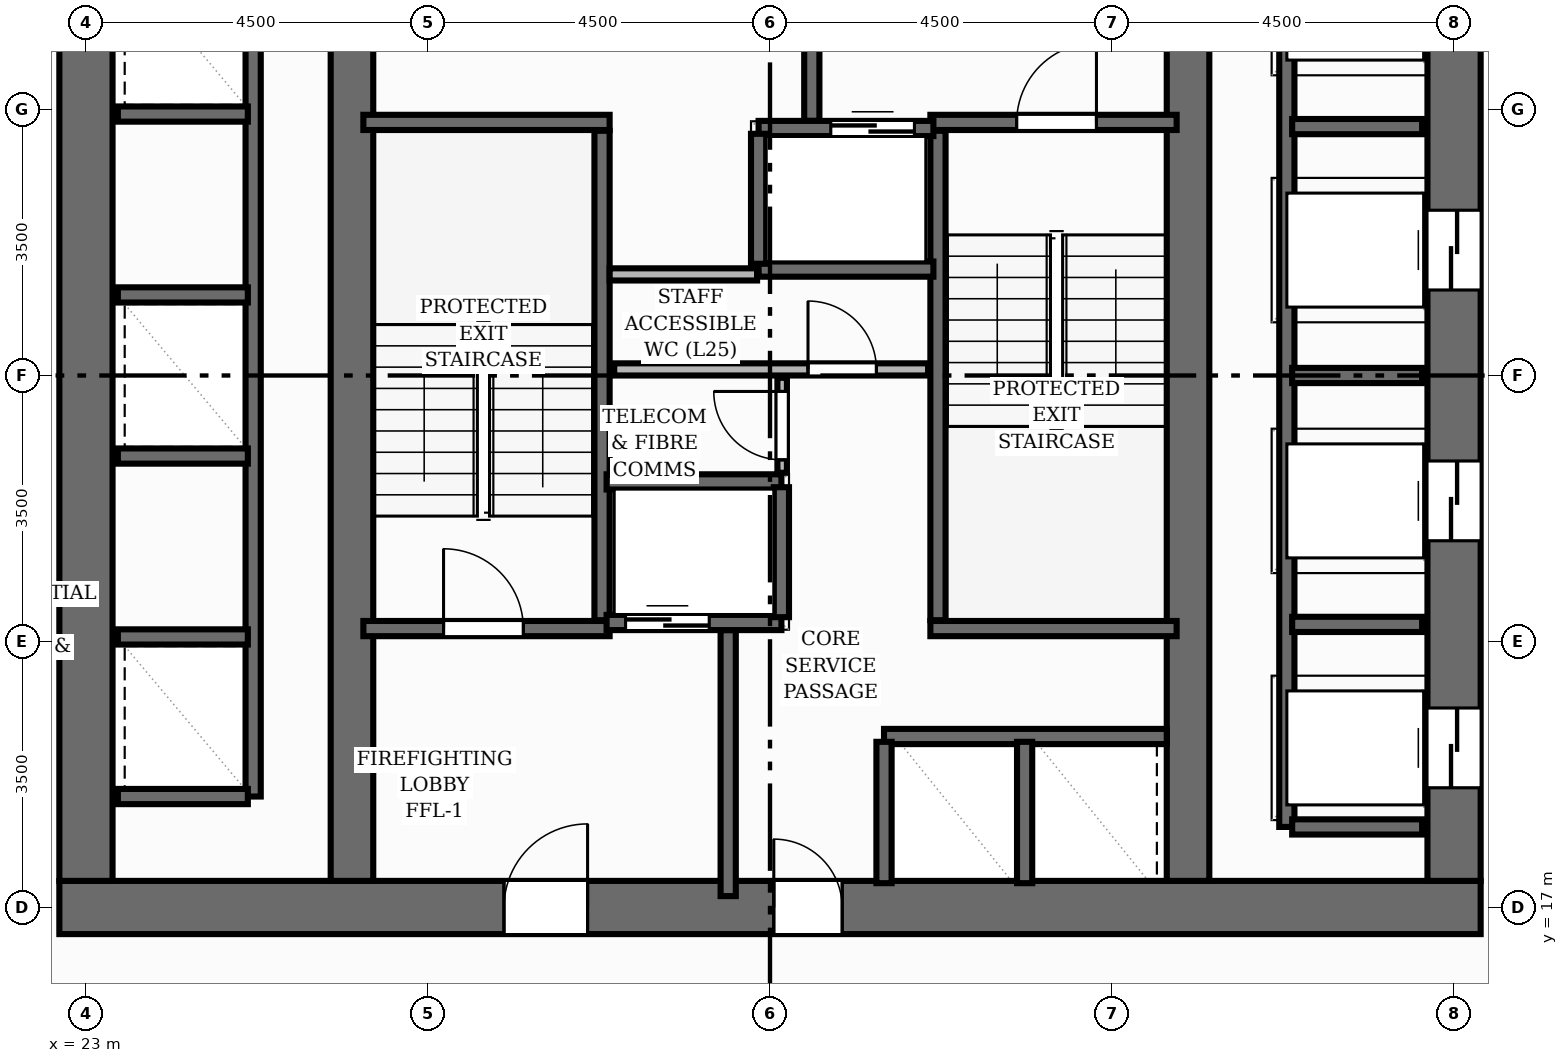
"""IFC4 building model, lengths in metres.
Left out: names, types, materials, properties, quantities, classifications, styles, units other than length and angle.
Written with IfcOpenShell. Run it as: python <this file> out.ifc"""

import sys

from ifc_helpers import new_model, si_unit, direction, frame, frame_2d, origin, place, context, subcontext, project, spatial, rectangle, extrude, element, fill, save


model = new_model("IFC4")
c1 = context("Model", 3, precision=1e-05, world=origin(), true_north=direction((0.0, 1.0)))
c2 = subcontext(c1, "Body", "Model", "MODEL_VIEW")
j1 = project(units=[si_unit("LENGTHUNIT", "METRE"), si_unit("PLANEANGLEUNIT", "RADIAN")], contexts=[c1])
p1 = place(None, origin())
s1 = spatial("IfcSite", under=j1, at=p1, CompositionType="ELEMENT")
p2 = place(p1, origin())
s2 = spatial("IfcBuilding", under=s1, at=p2, CompositionType="ELEMENT")
p3 = place(p2, frame((0.0, 0.0, 86.88)))
s3 = spatial("IfcBuildingStorey", under=s2, at=p3, CompositionType="ELEMENT", Elevation=86.88)
p4 = place(p3, frame((22.65, 17.0, 0.0), z_axis=(0.0, 0.0, 1.0), x_axis=(1.0, 0.0, 0.0)))
e1 = element("IfcWall", 1, at=p4, inside=s3, PredefinedType="SHEAR", context=c2, shape_type="SweptSolid", body=[
    extrude(rectangle(XDim=18.7, YDim=0.7, at=frame_2d((9.35, 0.0))), origin(), (0.0, 0.0, 1.0), 3.2),
])
p5 = place(p4, frame((5.85, 0.0, 0.0)))
e2 = element("IfcOpeningElement", 2, at=p5, cuts=e1, PredefinedType="OPENING", context=c2, shape_type="SweptSolid", body=[
    extrude(rectangle(XDim=1.1, YDim=2.15, at=frame_2d((0.55, 1.075))), frame((0.0, 0.36, 0.0), z_axis=(0.0, -1.0, 0.0), x_axis=(1.0, 0.0, 0.0)), (0.0, 0.0, 1.0), 0.72),
])
p6 = place(p4, frame((9.4, 0.0, 0.0)))
e3 = element("IfcOpeningElement", 3, at=p6, cuts=e1, PredefinedType="OPENING", context=c2, shape_type="SweptSolid", body=[
    extrude(rectangle(XDim=0.9, YDim=2.1, at=frame_2d((0.45, 1.05))), frame((0.0, 0.36, 0.0), z_axis=(0.0, -1.0, 0.0), x_axis=(1.0, 0.0, 0.0)), (0.0, 0.0, 1.0), 0.72),
])
p7 = place(p3, frame((23.0, 17.35, 0.0), z_axis=(0.0, 0.0, 1.0), x_axis=(0.0, 1.0, 0.0)))
e4 = element("IfcWall", 4, at=p7, inside=s3, PredefinedType="SHEAR", context=c2, shape_type="SweptSolid", body=[
    extrude(rectangle(XDim=13.3, YDim=0.7, at=frame_2d((6.65, 0.0))), origin(), (0.0, 0.0, 1.0), 3.2),
])
p8 = place(p3, frame((41.0, 17.35, 0.0), z_axis=(0.0, 0.0, 1.0), x_axis=(0.0, 1.0, 0.0)))
e5 = element("IfcWall", 5, at=p8, inside=s3, PredefinedType="SHEAR", context=c2, shape_type="SweptSolid", body=[
    extrude(rectangle(XDim=13.3, YDim=0.7, at=frame_2d((6.65, 0.0))), origin(), (0.0, 0.0, 1.0), 3.2),
])
p9 = place(p8, frame((1.225, 0.0, 0.0)))
e6 = element("IfcOpeningElement", 6, at=p9, cuts=e5, PredefinedType="OPENING", context=c2, shape_type="SweptSolid", body=[
    extrude(rectangle(XDim=1.05, YDim=2.15, at=frame_2d((0.525, 1.075))), frame((0.0, 0.36, 0.0), z_axis=(0.0, -1.0, 0.0), x_axis=(1.0, 0.0, 0.0)), (0.0, 0.0, 1.0), 0.72),
])
p10 = place(p8, frame((4.475, 0.0, 0.0)))
e7 = element("IfcOpeningElement", 7, at=p10, cuts=e5, PredefinedType="OPENING", context=c2, shape_type="SweptSolid", body=[
    extrude(rectangle(XDim=1.05, YDim=2.15, at=frame_2d((0.525, 1.075))), frame((0.0, 0.36, 0.0), z_axis=(0.0, -1.0, 0.0), x_axis=(1.0, 0.0, 0.0)), (0.0, 0.0, 1.0), 0.72),
])
p11 = place(p8, frame((7.775, 0.0, 0.0)))
e8 = element("IfcOpeningElement", 8, at=p11, cuts=e5, PredefinedType="OPENING", context=c2, shape_type="SweptSolid", body=[
    extrude(rectangle(XDim=1.05, YDim=2.15, at=frame_2d((0.525, 1.075))), frame((0.0, 0.36, 0.0), z_axis=(0.0, -1.0, 0.0), x_axis=(1.0, 0.0, 0.0)), (0.0, 0.0, 1.0), 0.72),
])
p12 = place(p8, frame((11.025, 0.0, 0.0)))
e9 = element("IfcOpeningElement", 9, at=p12, cuts=e5, PredefinedType="OPENING", context=c2, shape_type="SweptSolid", body=[
    extrude(rectangle(XDim=1.05, YDim=2.15, at=frame_2d((0.525, 1.075))), frame((0.0, 0.36, 0.0), z_axis=(0.0, -1.0, 0.0), x_axis=(1.0, 0.0, 0.0)), (0.0, 0.0, 1.0), 0.72),
])
for number, where, z_axis, x_axis in (
    (10, (26.5, 17.35, 0.0), (0.0, 0.0, 1.0), (0.0, 1.0, 0.0)),
    (11, (37.5, 17.35, 0.0), (0.0, 0.0, 1.0), (0.0, 1.0, 0.0)),
):
    element("IfcWall", number, at=place(p3, frame(where, z_axis=z_axis, x_axis=x_axis)), inside=s3, PredefinedType="SHEAR", context=c2, shape_type="SweptSolid", body=[
        extrude(rectangle(XDim=13.3, YDim=0.56, at=frame_2d((6.65, 0.0))), origin(), (0.0, 0.0, 1.0), 3.2),
    ])
p13 = place(p3, frame((29.79, 20.78, 0.0), z_axis=(0.0, 0.0, 1.0), x_axis=(0.0, 1.0, 0.0)))
e12 = element("IfcWall", 12, at=p13, inside=s3, PredefinedType="SHEAR", context=c2, shape_type="SweptSolid", body=[
    extrude(rectangle(XDim=6.44, YDim=0.2, at=frame_2d((3.22, 0.0))), origin(), (0.0, 0.0, 1.0), 3.2),
])
p14 = place(p3, frame((26.65, 27.33, 0.0), z_axis=(0.0, 0.0, 1.0), x_axis=(1.0, 0.0, 0.0)))
e13 = element("IfcWall", 13, at=p14, inside=s3, PredefinedType="SHEAR", context=c2, shape_type="SweptSolid", body=[
    extrude(rectangle(XDim=3.24, YDim=0.2, at=frame_2d((1.62, 0.0))), origin(), (0.0, 0.0, 1.0), 3.2),
])
p15 = place(p3, frame((26.65, 20.67, 0.0), z_axis=(0.0, 0.0, 1.0), x_axis=(1.0, 0.0, 0.0)))
e14 = element("IfcWall", 14, at=p15, inside=s3, PredefinedType="SHEAR", context=c2, shape_type="SweptSolid", body=[
    extrude(rectangle(XDim=3.24, YDim=0.2, at=frame_2d((1.62, 0.0))), origin(), (0.0, 0.0, 1.0), 3.2),
])
p16 = place(p15, frame((1.055, 0.0, 0.0)))
e15 = element("IfcOpeningElement", 15, at=p16, cuts=e14, PredefinedType="OPENING", context=c2, shape_type="SweptSolid", body=[
    extrude(rectangle(XDim=1.05, YDim=2.15, at=frame_2d((0.525, 1.075))), frame((0.0, 0.11, 0.0), z_axis=(0.0, -1.0, 0.0), x_axis=(1.0, 0.0, 0.0)), (0.0, 0.0, 1.0), 0.22),
])
p17 = place(p3, frame((34.21, 20.78, 0.0), z_axis=(0.0, 0.0, 1.0), x_axis=(0.0, 1.0, 0.0)))
e16 = element("IfcWall", 16, at=p17, inside=s3, PredefinedType="SHEAR", context=c2, shape_type="SweptSolid", body=[
    extrude(rectangle(XDim=6.44, YDim=0.2, at=frame_2d((3.22, 0.0))), origin(), (0.0, 0.0, 1.0), 3.2),
])
p18 = place(p3, frame((34.11, 20.67, 0.0), z_axis=(0.0, 0.0, 1.0), x_axis=(1.0, 0.0, 0.0)))
e17 = element("IfcWall", 17, at=p18, inside=s3, PredefinedType="SHEAR", context=c2, shape_type="SweptSolid", body=[
    extrude(rectangle(XDim=3.24, YDim=0.2, at=frame_2d((1.62, 0.0))), origin(), (0.0, 0.0, 1.0), 3.2),
])
p19 = place(p3, frame((34.11, 27.33, 0.0), z_axis=(0.0, 0.0, 1.0), x_axis=(1.0, 0.0, 0.0)))
e18 = element("IfcWall", 18, at=p19, inside=s3, PredefinedType="SHEAR", context=c2, shape_type="SweptSolid", body=[
    extrude(rectangle(XDim=3.24, YDim=0.2, at=frame_2d((1.62, 0.0))), origin(), (0.0, 0.0, 1.0), 3.2),
])
p20 = place(p19, frame((1.135, 0.0, 0.0)))
e19 = element("IfcOpeningElement", 19, at=p20, cuts=e18, PredefinedType="OPENING", context=c2, shape_type="SweptSolid", body=[
    extrude(rectangle(XDim=1.05, YDim=2.15, at=frame_2d((0.525, 1.075))), frame((0.0, 0.11, 0.0), z_axis=(0.0, -1.0, 0.0), x_axis=(1.0, 0.0, 0.0)), (0.0, 0.0, 1.0), 0.22),
])
for number, where, z_axis, x_axis in (
    (20, (31.45, 17.15, 0.0), (0.0, 0.0, 1.0), (0.0, 1.0, 0.0)),
    (21, (32.55, 27.35, 0.0), (0.0, 0.0, 1.0), (0.0, 1.0, 0.0)),
):
    element("IfcWall", number, at=place(p3, frame(where, z_axis=z_axis, x_axis=x_axis)), inside=s3, PredefinedType="SHEAR", context=c2, shape_type="SweptSolid", body=[
        extrude(rectangle(XDim=3.5, YDim=0.2, at=frame_2d((1.75, 0.0))), origin(), (0.0, 0.0, 1.0), 3.2),
    ])
p21 = place(p3, frame((29.85, 20.75, 0.0), z_axis=(0.0, 0.0, 1.0), x_axis=(1.0, 0.0, 0.0)))
e22 = element("IfcWall", 22, at=p21, inside=s3, PredefinedType="SHEAR", context=c2, shape_type="SweptSolid", body=[
    extrude(rectangle(XDim=2.3, YDim=0.2, at=frame_2d((1.15, 0.0))), origin(), (0.0, 0.0, 1.0), 3.2),
])
p22 = place(p21, frame((0.25, 0.0, 0.0)))
e23 = element("IfcOpeningElement", 23, at=p22, cuts=e22, PredefinedType="OPENING", context=c2, shape_type="SweptSolid", body=[
    extrude(rectangle(XDim=1.1, YDim=2.15, at=frame_2d((0.55, 1.075))), frame((0.0, 0.11, 0.0), z_axis=(0.0, -1.0, 0.0), x_axis=(1.0, 0.0, 0.0)), (0.0, 0.0, 1.0), 0.22),
])
p23 = place(p3, frame((29.85, 22.6, 0.0), z_axis=(0.0, 0.0, 1.0), x_axis=(1.0, 0.0, 0.0)))
e24 = element("IfcWall", 24, at=p23, inside=s3, PredefinedType="SHEAR", context=c2, shape_type="SweptSolid", body=[
    extrude(rectangle(XDim=2.3, YDim=0.2, at=frame_2d((1.15, 0.0))), origin(), (0.0, 0.0, 1.0), 3.2),
])
p24 = place(p3, frame((32.15, 20.82, 0.0), z_axis=(0.0, 0.0, 1.0), x_axis=(0.0, 1.0, 0.0)))
e25 = element("IfcWall", 25, at=p24, inside=s3, PredefinedType="SHEAR", context=c2, shape_type="SweptSolid", body=[
    extrude(rectangle(XDim=1.71, YDim=0.2, at=frame_2d((0.855, 0.0))), origin(), (0.0, 0.0, 1.0), 3.2),
])
p25 = place(p3, frame((31.85, 27.25, 0.0), z_axis=(0.0, 0.0, 1.0), x_axis=(1.0, 0.0, 0.0)))
e26 = element("IfcWall", 26, at=p25, inside=s3, PredefinedType="SHEAR", context=c2, shape_type="SweptSolid", body=[
    extrude(rectangle(XDim=2.3, YDim=0.2, at=frame_2d((1.15, 0.0))), origin(), (0.0, 0.0, 1.0), 3.2),
])
p26 = place(p25, frame((0.95, 0.0, 0.0)))
e27 = element("IfcOpeningElement", 27, at=p26, cuts=e26, PredefinedType="OPENING", context=c2, shape_type="SweptSolid", body=[
    extrude(rectangle(XDim=1.1, YDim=2.15, at=frame_2d((0.55, 1.075))), frame((0.0, 0.11, 0.0), z_axis=(0.0, -1.0, 0.0), x_axis=(1.0, 0.0, 0.0)), (0.0, 0.0, 1.0), 0.22),
])
p27 = place(p3, frame((31.85, 25.4, 0.0), z_axis=(0.0, 0.0, 1.0), x_axis=(1.0, 0.0, 0.0)))
e28 = element("IfcWall", 28, at=p27, inside=s3, PredefinedType="SHEAR", context=c2, shape_type="SweptSolid", body=[
    extrude(rectangle(XDim=2.3, YDim=0.2, at=frame_2d((1.15, 0.0))), origin(), (0.0, 0.0, 1.0), 3.2),
])
p28 = place(p3, frame((31.85, 25.47, 0.0), z_axis=(0.0, 0.0, 1.0), x_axis=(0.0, 1.0, 0.0)))
e29 = element("IfcWall", 29, at=p28, inside=s3, PredefinedType="SHEAR", context=c2, shape_type="SweptSolid", body=[
    extrude(rectangle(XDim=1.71, YDim=0.2, at=frame_2d((0.855, 0.0))), origin(), (0.0, 0.0, 1.0), 3.2),
])
p29 = place(p3, frame((38.8, 18.06, 0.0), z_axis=(0.0, 0.0, 1.0), x_axis=(0.0, 1.0, 0.0)))
e30 = element("IfcWall", 30, at=p29, inside=s3, PredefinedType="SHEAR", context=c2, shape_type="SweptSolid", body=[
    extrude(rectangle(XDim=11.88, YDim=0.2, at=frame_2d((5.94, 0.0))), origin(), (0.0, 0.0, 1.0), 3.2),
])
for number, where, z_axis, x_axis in (
    (31, (38.87, 18.06, 0.0), (0.0, 0.0, 1.0), (1.0, 0.0, 0.0)),
    (32, (38.87, 20.725, 0.0), (0.0, 0.0, 1.0), (1.0, 0.0, 0.0)),
    (33, (38.87, 24.0, 0.0), (0.0, 0.0, 1.0), (1.0, 0.0, 0.0)),
    (34, (38.87, 27.275, 0.0), (0.0, 0.0, 1.0), (1.0, 0.0, 0.0)),
):
    element("IfcWall", number, at=place(p3, frame(where, z_axis=z_axis, x_axis=x_axis)), inside=s3, PredefinedType="SHEAR", context=c2, shape_type="SweptSolid", body=[
        extrude(rectangle(XDim=1.71, YDim=0.2, at=frame_2d((0.855, 0.0))), origin(), (0.0, 0.0, 1.0), 3.2),
    ])
p30 = place(p3, frame((25.2, 18.46, 0.0), z_axis=(0.0, 0.0, 1.0), x_axis=(0.0, 1.0, 0.0)))
e35 = element("IfcWall", 35, at=p30, inside=s3, PredefinedType="SHEAR", context=c2, shape_type="SweptSolid", body=[
    extrude(rectangle(XDim=11.08, YDim=0.2, at=frame_2d((5.54, 0.0))), origin(), (0.0, 0.0, 1.0), 3.2),
])
for number, where, z_axis, x_axis in (
    (36, (23.42, 18.46, 0.0), (0.0, 0.0, 1.0), (1.0, 0.0, 0.0)),
    (37, (23.42, 20.56, 0.0), (0.0, 0.0, 1.0), (1.0, 0.0, 0.0)),
    (38, (23.42, 22.94, 0.0), (0.0, 0.0, 1.0), (1.0, 0.0, 0.0)),
    (39, (23.42, 25.06, 0.0), (0.0, 0.0, 1.0), (1.0, 0.0, 0.0)),
    (40, (23.42, 27.44, 0.0), (0.0, 0.0, 1.0), (1.0, 0.0, 0.0)),
):
    element("IfcWall", number, at=place(p3, frame(where, z_axis=z_axis, x_axis=x_axis)), inside=s3, PredefinedType="SHEAR", context=c2, shape_type="SweptSolid", body=[
        extrude(rectangle(XDim=1.71, YDim=0.2, at=frame_2d((0.855, 0.0))), origin(), (0.0, 0.0, 1.0), 3.2),
    ])
p31 = place(p3, frame((33.5, 19.25, 0.0), z_axis=(0.0, 0.0, 1.0), x_axis=(1.0, 0.0, 0.0)))
e41 = element("IfcWall", 41, at=p31, inside=s3, PredefinedType="SHEAR", context=c2, shape_type="SweptSolid", body=[
    extrude(rectangle(XDim=3.72, YDim=0.2, at=frame_2d((1.86, 0.0))), origin(), (0.0, 0.0, 1.0), 3.2),
])
for number, where, z_axis, x_axis in (
    (42, (33.5, 17.32, 0.0), (0.0, 0.0, 1.0), (0.0, 1.0, 0.0)),
    (43, (35.35, 17.32, 0.0), (0.0, 0.0, 1.0), (0.0, 1.0, 0.0)),
):
    element("IfcWall", number, at=place(p3, frame(where, z_axis=z_axis, x_axis=x_axis)), inside=s3, PredefinedType="SHEAR", context=c2, shape_type="SweptSolid", body=[
        extrude(rectangle(XDim=1.86, YDim=0.2, at=frame_2d((0.93, 0.0))), origin(), (0.0, 0.0, 1.0), 3.2),
    ])
p32 = place(p3, frame((29.95, 24.08, 0.0), z_axis=(0.0, 0.0, 1.0), x_axis=(1.0, 0.0, 0.0)))
e44 = element("IfcWall", 44, at=p32, inside=s3, PredefinedType="PLUMBINGWALL", context=c2, shape_type="SweptSolid", body=[
    extrude(rectangle(XDim=4.13, YDim=0.16, at=frame_2d((2.065, 0.0))), origin(), (0.0, 0.0, 1.0), 2.955),
])
p33 = place(p32, frame((2.55, 0.0, 0.0)))
e45 = element("IfcOpeningElement", 45, at=p33, cuts=e44, PredefinedType="OPENING", context=c2, shape_type="SweptSolid", body=[
    extrude(rectangle(XDim=0.9, YDim=2.1, at=frame_2d((0.45, 1.05))), frame((0.0, 0.09, 0.0), z_axis=(0.0, -1.0, 0.0), x_axis=(1.0, 0.0, 0.0)), (0.0, 0.0, 1.0), 0.18),
])
p34 = place(p3, frame((32.16, 22.72, 0.0), z_axis=(0.0, 0.0, 1.0), x_axis=(0.0, 1.0, 0.0)))
e46 = element("IfcWall", 46, at=p34, inside=s3, PredefinedType="PARTITIONING", context=c2, shape_type="SweptSolid", body=[
    extrude(rectangle(XDim=1.25, YDim=0.125, at=frame_2d((0.625, 0.0))), origin(), (0.0, 0.0, 1.0), 2.955),
])
p35 = place(p34, frame((0.17, 0.0, 0.0)))
e47 = element("IfcOpeningElement", 47, at=p35, cuts=e46, PredefinedType="OPENING", context=c2, shape_type="SweptSolid", body=[
    extrude(rectangle(XDim=0.9, YDim=2.1, at=frame_2d((0.45, 1.05))), frame((0.0, 0.073, 0.0), z_axis=(0.0, -1.0, 0.0), x_axis=(1.0, 0.0, 0.0)), (0.0, 0.0, 1.0), 0.145),
])
p36 = place(p3, frame((29.89, 25.33, 0.0), z_axis=(0.0, 0.0, 1.0), x_axis=(1.0, 0.0, 0.0)))
e48 = element("IfcWall", 48, at=p36, inside=s3, PredefinedType="PLUMBINGWALL", context=c2, shape_type="SweptSolid", body=[
    extrude(rectangle(XDim=1.94, YDim=0.16, at=frame_2d((0.97, 0.0))), origin(), (0.0, 0.0, 1.0), 2.955),
])
p37 = place(p3, frame((22.888, 13.04, 0.0), z_axis=(0.0, 0.0, 1.0), x_axis=(-0.753425123405, 0.657533712765, 0.0)))
e49 = element("IfcWall", 49, at=p37, inside=s3, PredefinedType="PARTITIONING", context=c2, shape_type="SweptSolid", body=[
    extrude(rectangle(XDim=4.72, YDim=0.125, at=frame_2d((2.36, 0.0))), origin(), (0.0, 0.0, 1.0), 2.404),
])
p38 = place(p37, frame((1.49, 0.0, 0.0)))
e50 = element("IfcOpeningElement", 50, at=p38, cuts=e49, PredefinedType="OPENING", context=c2, shape_type="SweptSolid", body=[
    extrude(rectangle(XDim=0.9, YDim=2.1, at=frame_2d((0.45, 1.05))), frame((0.0, 0.073, 0.0), z_axis=(0.0, -1.0, 0.0), x_axis=(1.0, 0.0, 0.0)), (0.0, 0.0, 1.0), 0.145),
])
p39 = place(p16, origin())
e51 = element("IfcDoor", 51, at=p39, inside=s3, OperationType="SINGLE_SWING_LEFT", PredefinedType="DOOR", context=c2, shape_type="SweptSolid", body=[
    extrude(rectangle(XDim=1.05, YDim=2.15, at=frame_2d((0.525, 1.075))), frame((0.0, 0.025, 0.0), z_axis=(0.0, -1.0, 0.0), x_axis=(1.0, 0.0, 0.0)), (0.0, 0.0, 1.0), 0.05),
])
fill(e15, e51)
p40 = place(p20, origin())
e52 = element("IfcDoor", 52, at=p40, inside=s3, OperationType="SINGLE_SWING_RIGHT", PredefinedType="DOOR", context=c2, shape_type="SweptSolid", body=[
    extrude(rectangle(XDim=1.05, YDim=2.15, at=frame_2d((0.525, 1.075))), frame((0.0, 0.025, 0.0), z_axis=(0.0, -1.0, 0.0), x_axis=(1.0, 0.0, 0.0)), (0.0, 0.0, 1.0), 0.05),
])
fill(e19, e52)
p41 = place(p5, origin())
e53 = element("IfcDoor", 53, at=p41, inside=s3, OperationType="SINGLE_SWING_RIGHT", PredefinedType="DOOR", context=c2, shape_type="SweptSolid", body=[
    extrude(rectangle(XDim=1.1, YDim=2.15, at=frame_2d((0.55, 1.075))), frame((0.0, 0.025, 0.0), z_axis=(0.0, -1.0, 0.0), x_axis=(1.0, 0.0, 0.0)), (0.0, 0.0, 1.0), 0.05),
])
fill(e2, e53)
p42 = place(p22, origin())
e54 = element("IfcDoor", 54, at=p42, inside=s3, OperationType="DOUBLE_DOOR_SLIDING", PredefinedType="DOOR", context=c2, shape_type="SweptSolid", body=[
    extrude(rectangle(XDim=1.1, YDim=2.15, at=frame_2d((0.55, 1.075))), frame((0.0, 0.025, 0.0), z_axis=(0.0, -1.0, 0.0), x_axis=(1.0, 0.0, 0.0)), (0.0, 0.0, 1.0), 0.05),
])
fill(e23, e54)
p43 = place(p26, origin())
e55 = element("IfcDoor", 55, at=p43, inside=s3, OperationType="DOUBLE_DOOR_SLIDING", PredefinedType="DOOR", context=c2, shape_type="SweptSolid", body=[
    extrude(rectangle(XDim=1.1, YDim=2.15, at=frame_2d((0.55, 1.075))), frame((0.0, 0.025, 0.0), z_axis=(0.0, -1.0, 0.0), x_axis=(1.0, 0.0, 0.0)), (0.0, 0.0, 1.0), 0.05),
])
fill(e27, e55)
p44 = place(p9, origin())
e56 = element("IfcDoor", 56, at=p44, inside=s3, OperationType="DOUBLE_DOOR_SLIDING", PredefinedType="DOOR", context=c2, shape_type="SweptSolid", body=[
    extrude(rectangle(XDim=1.05, YDim=2.15, at=frame_2d((0.525, 1.075))), frame((0.0, 0.025, 0.0), z_axis=(0.0, -1.0, 0.0), x_axis=(1.0, 0.0, 0.0)), (0.0, 0.0, 1.0), 0.05),
])
fill(e6, e56)
p45 = place(p10, origin())
e57 = element("IfcDoor", 57, at=p45, inside=s3, OperationType="DOUBLE_DOOR_SLIDING", PredefinedType="DOOR", context=c2, shape_type="SweptSolid", body=[
    extrude(rectangle(XDim=1.05, YDim=2.15, at=frame_2d((0.525, 1.075))), frame((0.0, 0.025, 0.0), z_axis=(0.0, -1.0, 0.0), x_axis=(1.0, 0.0, 0.0)), (0.0, 0.0, 1.0), 0.05),
])
fill(e7, e57)
p46 = place(p11, origin())
e58 = element("IfcDoor", 58, at=p46, inside=s3, OperationType="DOUBLE_DOOR_SLIDING", PredefinedType="DOOR", context=c2, shape_type="SweptSolid", body=[
    extrude(rectangle(XDim=1.05, YDim=2.15, at=frame_2d((0.525, 1.075))), frame((0.0, 0.025, 0.0), z_axis=(0.0, -1.0, 0.0), x_axis=(1.0, 0.0, 0.0)), (0.0, 0.0, 1.0), 0.05),
])
fill(e8, e58)
p47 = place(p6, origin())
e59 = element("IfcDoor", 59, at=p47, inside=s3, OperationType="SINGLE_SWING_LEFT", PredefinedType="DOOR", context=c2, shape_type="SweptSolid", body=[
    extrude(rectangle(XDim=0.9, YDim=2.1, at=frame_2d((0.45, 1.05))), frame((0.0, 0.025, 0.0), z_axis=(0.0, -1.0, 0.0), x_axis=(1.0, 0.0, 0.0)), (0.0, 0.0, 1.0), 0.05),
])
fill(e3, e59)
p48 = place(p33, origin())
e60 = element("IfcDoor", 60, at=p48, inside=s3, OperationType="SINGLE_SWING_LEFT", PredefinedType="DOOR", context=c2, shape_type="SweptSolid", body=[
    extrude(rectangle(XDim=0.9, YDim=2.1, at=frame_2d((0.45, 1.05))), frame((0.0, 0.025, 0.0), z_axis=(0.0, -1.0, 0.0), x_axis=(1.0, 0.0, 0.0)), (0.0, 0.0, 1.0), 0.05),
])
fill(e45, e60)
p49 = place(p35, origin())
e61 = element("IfcDoor", 61, at=p49, inside=s3, OperationType="SINGLE_SWING_RIGHT", PredefinedType="DOOR", context=c2, shape_type="SweptSolid", body=[
    extrude(rectangle(XDim=0.9, YDim=2.1, at=frame_2d((0.45, 1.05))), frame((0.0, 0.025, 0.0), z_axis=(0.0, -1.0, 0.0), x_axis=(1.0, 0.0, 0.0)), (0.0, 0.0, 1.0), 0.05),
])
fill(e47, e61)
save(model, sys.argv[1])
